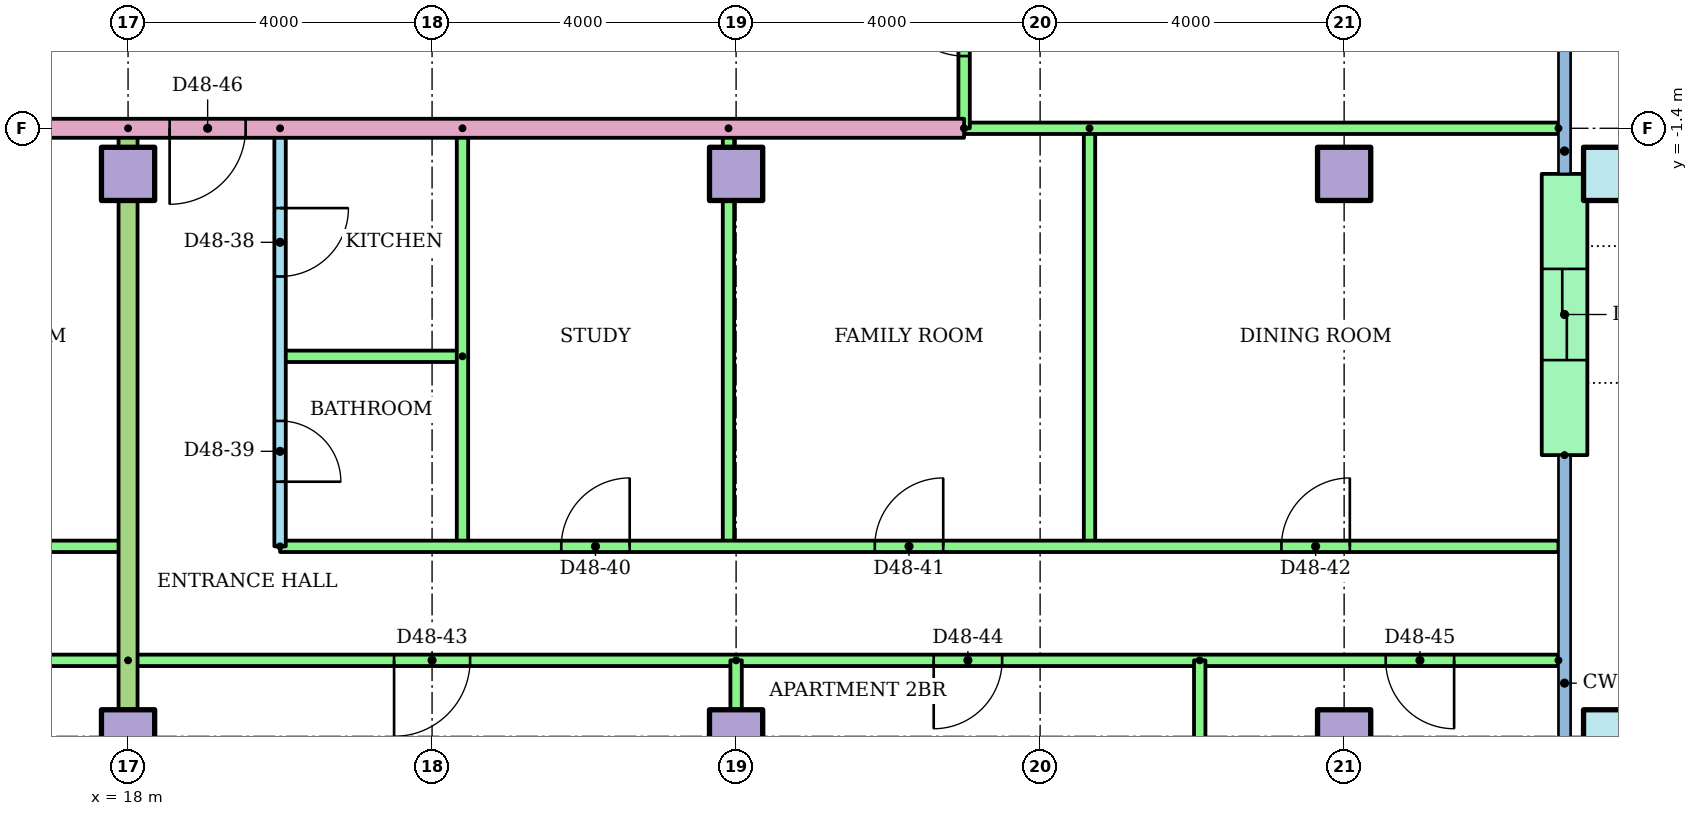
"""IFC4 building model, lengths in metres.
Left out: names, types, materials, properties, quantities, classifications, styles, units other than length and angle.
Written with IfcOpenShell. Run it as: python <this file> out.ifc"""

import sys

from ifc_helpers import new_model, si_unit, direction, frame, frame_2d, origin, origin_2d, place, context, subcontext, project, spatial, rectangle, hollow_rectangle, extrude, element, fill, save


model = new_model("IFC4")
c1 = context("Model", 3, precision=1e-05, world=origin(), true_north=direction((0.0, 1.0)))
c2 = subcontext(c1, "Body", "Model", "MODEL_VIEW")
j1 = project(units=[si_unit("LENGTHUNIT", "METRE"), si_unit("PLANEANGLEUNIT", "RADIAN")], contexts=[c1])
p1 = place(None, origin())
s1 = spatial("IfcSite", under=j1, at=p1, CompositionType="ELEMENT")
p2 = place(p1, origin())
s2 = spatial("IfcBuilding", under=s1, at=p2, CompositionType="ELEMENT")
p3 = place(p2, frame((0.0, 0.0, 184.5)))
s3 = spatial("IfcBuildingStorey", under=s2, at=p3, CompositionType="ELEMENT", Elevation=184.5)
for number, where in (
    (1, (18.0, -9.4, 0.0)),
    (2, (26.0, -9.4, 0.0)),
    (3, (34.0, -9.4, 0.0)),
):
    element("IfcColumn", number, at=place(p3, frame(where)), inside=s3, PredefinedType="COLUMN", context=c2, shape_type="SweptSolid", body=[
        extrude(rectangle(XDim=0.7, YDim=0.7, at=origin_2d()), origin(), (0.0, 0.0, 1.0), 3.2),
    ])
p4 = place(p3, frame((37.5, -9.4, 0.0)))
e4 = element("IfcColumn", 4, at=p4, inside=s3, PredefinedType="COLUMN", context=c2, shape_type="SweptSolid", body=[
    extrude(hollow_rectangle(XDim=0.7, YDim=0.7, WallThickness=0.036, at=origin_2d()), origin(), (0.0, 0.0, 1.0), 3.2),
])
for number, where in (
    (5, (18.0, -2.0, 0.0)),
    (6, (26.0, -2.0, 0.0)),
    (7, (34.0, -2.0, 0.0)),
):
    element("IfcColumn", number, at=place(p3, frame(where)), inside=s3, PredefinedType="COLUMN", context=c2, shape_type="SweptSolid", body=[
        extrude(rectangle(XDim=0.7, YDim=0.7, at=origin_2d()), origin(), (0.0, 0.0, 1.0), 3.2),
    ])
p5 = place(p3, frame((37.5, -2.0, 0.0)))
e8 = element("IfcColumn", 8, at=p5, inside=s3, PredefinedType="COLUMN", context=c2, shape_type="SweptSolid", body=[
    extrude(hollow_rectangle(XDim=0.7, YDim=0.7, WallThickness=0.036, at=origin_2d()), origin(), (0.0, 0.0, 1.0), 3.2),
])
p6 = place(p3, frame((36.9, -5.7, 0.0), z_axis=(0.0, 0.0, 1.0), x_axis=(0.0, 1.0, 0.0)))
e9 = element("IfcWall", 9, at=p6, inside=s3, PredefinedType="STANDARD", context=c2, shape_type="SweptSolid", body=[
    extrude(rectangle(XDim=3.7, YDim=0.6, at=frame_2d((1.85, 0.0))), origin(), (0.0, 0.0, 1.0), 2.92),
])
p7 = place(p6, frame((1.25, 0.0, 0.0)))
e10 = element("IfcOpeningElement", 10, at=p7, cuts=e9, PredefinedType="OPENING", context=c2, shape_type="SweptSolid", body=[
    extrude(rectangle(XDim=1.2, YDim=2.1, at=frame_2d((0.6, 1.05))), frame((0.0, 0.31, 0.0), z_axis=(0.0, -1.0, 0.0), x_axis=(1.0, 0.0, 0.0)), (0.0, 0.0, 1.0), 0.62),
])
p8 = place(p3, frame((12.0, -6.9, 0.0)))
e11 = element("IfcWall", 11, at=p8, inside=s3, PredefinedType="PARTITIONING", context=c2, shape_type="SweptSolid", body=[
    extrude(rectangle(XDim=6.0, YDim=0.15, at=frame_2d((3.0, 0.0))), origin(), (0.0, 0.0, 1.0), 2.4),
])
p9 = place(p8, frame((3.75, 0.0, 0.0)))
e12 = element("IfcOpeningElement", 12, at=p9, cuts=e11, PredefinedType="OPENING", context=c2, shape_type="SweptSolid", body=[
    extrude(rectangle(XDim=0.9, YDim=2.1, at=frame_2d((0.45, 1.05))), frame((0.0, 0.085, 0.0), z_axis=(0.0, -1.0, 0.0), x_axis=(1.0, 0.0, 0.0)), (0.0, 0.0, 1.0), 0.17),
])
p10 = place(p3, frame((18.0, -8.4, 0.0), z_axis=(0.0, 0.0, 1.0), x_axis=(-1.0, 0.0, 0.0)))
e13 = element("IfcWall", 13, at=p10, inside=s3, PredefinedType="PARTITIONING", context=c2, shape_type="SweptSolid", body=[
    extrude(rectangle(XDim=8.0, YDim=0.15, at=frame_2d((4.0, 0.0))), origin(), (0.0, 0.0, 1.0), 2.4),
])
p11 = place(p10, frame((5.55, 0.0, 0.0)))
e14 = element("IfcOpeningElement", 14, at=p11, cuts=e13, PredefinedType="OPENING", context=c2, shape_type="SweptSolid", body=[
    extrude(rectangle(XDim=0.9, YDim=2.1, at=frame_2d((0.45, 1.05))), frame((0.0, 0.085, 0.0), z_axis=(0.0, -1.0, 0.0), x_axis=(1.0, 0.0, 0.0)), (0.0, 0.0, 1.0), 0.17),
])
p12 = place(p10, frame((1.5, 0.0, 0.0)))
e15 = element("IfcOpeningElement", 15, at=p12, cuts=e13, PredefinedType="OPENING", context=c2, shape_type="SweptSolid", body=[
    extrude(rectangle(XDim=1.0, YDim=2.1, at=frame_2d((0.5, 1.05))), frame((0.0, 0.085, 0.0), z_axis=(0.0, -1.0, 0.0), x_axis=(1.0, 0.0, 0.0)), (0.0, 0.0, 1.0), 0.17),
])
p13 = place(p3, frame((20.0, -1.4, 0.0), z_axis=(0.0, 0.0, 1.0), x_axis=(0.0, -1.0, 0.0)))
e16 = element("IfcWall", 16, at=p13, inside=s3, PredefinedType="PARTITIONING", context=c2, shape_type="SweptSolid", body=[
    extrude(rectangle(XDim=5.5, YDim=0.15, at=frame_2d((2.75, 0.0))), origin(), (0.0, 0.0, 1.0), 2.4),
])
p14 = place(p13, frame((1.05, 0.0, 0.0)))
e17 = element("IfcOpeningElement", 17, at=p14, cuts=e16, PredefinedType="OPENING", context=c2, shape_type="SweptSolid", body=[
    extrude(rectangle(XDim=0.9, YDim=2.1, at=frame_2d((0.45, 1.05))), frame((0.0, 0.085, 0.0), z_axis=(0.0, -1.0, 0.0), x_axis=(1.0, 0.0, 0.0)), (0.0, 0.0, 1.0), 0.17),
])
p15 = place(p13, frame((3.85, 0.0, 0.0)))
e18 = element("IfcOpeningElement", 18, at=p15, cuts=e16, PredefinedType="OPENING", context=c2, shape_type="SweptSolid", body=[
    extrude(rectangle(XDim=0.8, YDim=2.1, at=frame_2d((0.4, 1.05))), frame((0.0, 0.085, 0.0), z_axis=(0.0, -1.0, 0.0), x_axis=(1.0, 0.0, 0.0)), (0.0, 0.0, 1.0), 0.17),
])
p16 = place(p3, frame((22.4, -4.4, 0.0), z_axis=(0.0, 0.0, 1.0), x_axis=(-1.0, 0.0, 0.0)))
e19 = element("IfcWall", 19, at=p16, inside=s3, PredefinedType="PARTITIONING", context=c2, shape_type="SweptSolid", body=[
    extrude(rectangle(XDim=2.4, YDim=0.15, at=frame_2d((1.2, 0.0))), origin(), (0.0, 0.0, 1.0), 2.4),
])
for number, where, z_axis, x_axis in (
    (20, (22.4, -1.4, 0.0), (0.0, 0.0, 1.0), (0.0, -1.0, 0.0)),
    (21, (25.9, -1.4, 0.0), (0.0, 0.0, 1.0), (0.0, -1.0, 0.0)),
    (22, (30.65, -1.4, 0.0), (0.0, 0.0, 1.0), (0.0, -1.0, 0.0)),
):
    element("IfcWall", number, at=place(p3, frame(where, z_axis=z_axis, x_axis=x_axis)), inside=s3, PredefinedType="PARTITIONING", context=c2, shape_type="SweptSolid", body=[
        extrude(rectangle(XDim=5.5, YDim=0.15, at=frame_2d((2.75, 0.0))), origin(), (0.0, 0.0, 1.0), 2.4),
    ])
p17 = place(p3, frame((20.0, -6.9, 0.0)))
e23 = element("IfcWall", 23, at=p17, inside=s3, PredefinedType="PARTITIONING", context=c2, shape_type="SweptSolid", body=[
    extrude(rectangle(XDim=16.82, YDim=0.15, at=frame_2d((8.41, 0.0))), origin(), (0.0, 0.0, 1.0), 2.4),
])
p18 = place(p17, frame((3.7, 0.0, 0.0)))
e24 = element("IfcOpeningElement", 24, at=p18, cuts=e23, PredefinedType="OPENING", context=c2, shape_type="SweptSolid", body=[
    extrude(rectangle(XDim=0.9, YDim=2.1, at=frame_2d((0.45, 1.05))), frame((0.0, 0.085, 0.0), z_axis=(0.0, -1.0, 0.0), x_axis=(1.0, 0.0, 0.0)), (0.0, 0.0, 1.0), 0.17),
])
p19 = place(p17, frame((7.825, 0.0, 0.0)))
e25 = element("IfcOpeningElement", 25, at=p19, cuts=e23, PredefinedType="OPENING", context=c2, shape_type="SweptSolid", body=[
    extrude(rectangle(XDim=0.9, YDim=2.1, at=frame_2d((0.45, 1.05))), frame((0.0, 0.085, 0.0), z_axis=(0.0, -1.0, 0.0), x_axis=(1.0, 0.0, 0.0)), (0.0, 0.0, 1.0), 0.17),
])
p20 = place(p17, frame((13.175, 0.0, 0.0)))
e26 = element("IfcOpeningElement", 26, at=p20, cuts=e23, PredefinedType="OPENING", context=c2, shape_type="SweptSolid", body=[
    extrude(rectangle(XDim=0.9, YDim=2.1, at=frame_2d((0.45, 1.05))), frame((0.0, 0.085, 0.0), z_axis=(0.0, -1.0, 0.0), x_axis=(1.0, 0.0, 0.0)), (0.0, 0.0, 1.0), 0.17),
])
p21 = place(p3, frame((36.82, -8.4, 0.0), z_axis=(0.0, 0.0, 1.0), x_axis=(-1.0, 0.0, 0.0)))
e27 = element("IfcWall", 27, at=p21, inside=s3, PredefinedType="PARTITIONING", context=c2, shape_type="SweptSolid", body=[
    extrude(rectangle(XDim=18.82, YDim=0.15, at=frame_2d((9.41, 0.0))), origin(), (0.0, 0.0, 1.0), 2.4),
])
p22 = place(p21, frame((14.32, 0.0, 0.0)))
e28 = element("IfcOpeningElement", 28, at=p22, cuts=e27, PredefinedType="OPENING", context=c2, shape_type="SweptSolid", body=[
    extrude(rectangle(XDim=1.0, YDim=2.1, at=frame_2d((0.5, 1.05))), frame((0.0, 0.085, 0.0), z_axis=(0.0, -1.0, 0.0), x_axis=(1.0, 0.0, 0.0)), (0.0, 0.0, 1.0), 0.17),
])
p23 = place(p21, frame((7.32, 0.0, 0.0)))
e29 = element("IfcOpeningElement", 29, at=p23, cuts=e27, PredefinedType="OPENING", context=c2, shape_type="SweptSolid", body=[
    extrude(rectangle(XDim=0.9, YDim=2.1, at=frame_2d((0.45, 1.05))), frame((0.0, 0.085, 0.0), z_axis=(0.0, -1.0, 0.0), x_axis=(1.0, 0.0, 0.0)), (0.0, 0.0, 1.0), 0.17),
])
p24 = place(p21, frame((1.373, 0.0, 0.0)))
e30 = element("IfcOpeningElement", 30, at=p24, cuts=e27, PredefinedType="OPENING", context=c2, shape_type="SweptSolid", body=[
    extrude(rectangle(XDim=0.9, YDim=2.1, at=frame_2d((0.45, 1.05))), frame((0.0, 0.085, 0.0), z_axis=(0.0, -1.0, 0.0), x_axis=(1.0, 0.0, 0.0)), (0.0, 0.0, 1.0), 0.17),
])
p25 = place(p3, frame((26.0, -8.4, 0.0), z_axis=(0.0, 0.0, 1.0), x_axis=(0.0, -1.0, 0.0)))
e31 = element("IfcWall", 31, at=p25, inside=s3, PredefinedType="PARTITIONING", context=c2, shape_type="SweptSolid", body=[
    extrude(rectangle(XDim=8.01, YDim=0.15, at=frame_2d((4.005, 0.0))), origin(), (0.0, 0.0, 1.0), 2.4),
])
p26 = place(p3, frame((32.1, -8.4, 0.0), z_axis=(0.0, 0.0, 1.0), x_axis=(0.0, -1.0, 0.0)))
e32 = element("IfcWall", 32, at=p26, inside=s3, PredefinedType="PARTITIONING", context=c2, shape_type="SweptSolid", body=[
    extrude(rectangle(XDim=6.22, YDim=0.15, at=frame_2d((3.11, 0.0))), origin(), (0.0, 0.0, 1.0), 2.4),
])
p27 = place(p3, frame((18.0, -1.4, 0.0), z_axis=(0.0, 0.0, 1.0), x_axis=(0.0, -1.0, 0.0)))
e33 = element("IfcWall", 33, at=p27, inside=s3, PredefinedType="PARTITIONING", context=c2, shape_type="SweptSolid", body=[
    extrude(rectangle(XDim=15.01, YDim=0.25, at=frame_2d((7.505, 0.0))), origin(), (0.0, 0.0, 1.0), 2.4),
])
p28 = place(p3, frame((29.0, -1.4, 0.0), z_axis=(0.0, 0.0, 1.0), x_axis=(-1.0, 0.0, 0.0)))
e34 = element("IfcWall", 34, at=p28, inside=s3, PredefinedType="PARTITIONING", context=c2, shape_type="SweptSolid", body=[
    extrude(rectangle(XDim=15.0, YDim=0.25, at=frame_2d((7.5, 0.0))), origin(), (0.0, 0.0, 1.0), 2.4),
])
p29 = place(p28, frame((9.453, 0.0, 0.0)))
e35 = element("IfcOpeningElement", 35, at=p29, cuts=e34, PredefinedType="OPENING", context=c2, shape_type="SweptSolid", body=[
    extrude(rectangle(XDim=1.0, YDim=2.1, at=frame_2d((0.5, 1.05))), frame((0.0, 0.135, 0.0), z_axis=(0.0, -1.0, 0.0), x_axis=(1.0, 0.0, 0.0)), (0.0, 0.0, 1.0), 0.27),
])
p30 = place(p3, frame((36.82, -1.4, 0.0), z_axis=(0.0, 0.0, 1.0), x_axis=(-1.0, 0.0, 0.0)))
e36 = element("IfcWall", 36, at=p30, inside=s3, PredefinedType="PARTITIONING", context=c2, shape_type="SweptSolid", body=[
    extrude(rectangle(XDim=7.82, YDim=0.15, at=frame_2d((3.91, 0.0))), origin(), (0.0, 0.0, 1.0), 2.4),
])
p31 = place(p3, frame((29.0, -1.4, 0.0), z_axis=(0.0, 0.0, 1.0), x_axis=(0.0, 1.0, 0.0)))
e37 = element("IfcWall", 37, at=p31, inside=s3, PredefinedType="PARTITIONING", context=c2, shape_type="SweptSolid", body=[
    extrude(rectangle(XDim=2.8, YDim=0.15, at=frame_2d((1.4, 0.0))), origin(), (0.0, 0.0, 1.0), 2.4),
])
p32 = place(p31, frame((0.95, 0.0, 0.0)))
e38 = element("IfcOpeningElement", 38, at=p32, cuts=e37, PredefinedType="OPENING", context=c2, shape_type="SweptSolid", body=[
    extrude(rectangle(XDim=0.9, YDim=2.1, at=frame_2d((0.45, 1.05))), frame((0.0, 0.085, 0.0), z_axis=(0.0, -1.0, 0.0), x_axis=(1.0, 0.0, 0.0)), (0.0, 0.0, 1.0), 0.17),
])
p33 = place(p14, origin())
e39 = element("IfcDoor", 39, at=p33, inside=s3, OperationType="SINGLE_SWING_LEFT", PredefinedType="DOOR", context=c2, shape_type="SweptSolid", body=[
    extrude(rectangle(XDim=0.9, YDim=2.1, at=frame_2d((0.45, 1.05))), frame((0.0, 0.025, 0.0), z_axis=(0.0, -1.0, 0.0), x_axis=(1.0, 0.0, 0.0)), (0.0, 0.0, 1.0), 0.05),
])
fill(e17, e39)
p34 = place(p15, origin())
e40 = element("IfcDoor", 40, at=p34, inside=s3, OperationType="SINGLE_SWING_RIGHT", PredefinedType="DOOR", context=c2, shape_type="SweptSolid", body=[
    extrude(rectangle(XDim=0.8, YDim=2.1, at=frame_2d((0.4, 1.05))), frame((0.0, 0.025, 0.0), z_axis=(0.0, -1.0, 0.0), x_axis=(1.0, 0.0, 0.0)), (0.0, 0.0, 1.0), 0.05),
])
fill(e18, e40)
p35 = place(p18, origin())
e41 = element("IfcDoor", 41, at=p35, inside=s3, OperationType="SINGLE_SWING_RIGHT", PredefinedType="DOOR", context=c2, shape_type="SweptSolid", body=[
    extrude(rectangle(XDim=0.9, YDim=2.1, at=frame_2d((0.45, 1.05))), frame((0.0, 0.025, 0.0), z_axis=(0.0, -1.0, 0.0), x_axis=(1.0, 0.0, 0.0)), (0.0, 0.0, 1.0), 0.05),
])
fill(e24, e41)
p36 = place(p19, origin())
e42 = element("IfcDoor", 42, at=p36, inside=s3, OperationType="SINGLE_SWING_RIGHT", PredefinedType="DOOR", context=c2, shape_type="SweptSolid", body=[
    extrude(rectangle(XDim=0.9, YDim=2.1, at=frame_2d((0.45, 1.05))), frame((0.0, 0.025, 0.0), z_axis=(0.0, -1.0, 0.0), x_axis=(1.0, 0.0, 0.0)), (0.0, 0.0, 1.0), 0.05),
])
fill(e25, e42)
p37 = place(p20, origin())
e43 = element("IfcDoor", 43, at=p37, inside=s3, OperationType="SINGLE_SWING_RIGHT", PredefinedType="DOOR", context=c2, shape_type="SweptSolid", body=[
    extrude(rectangle(XDim=0.9, YDim=2.1, at=frame_2d((0.45, 1.05))), frame((0.0, 0.025, 0.0), z_axis=(0.0, -1.0, 0.0), x_axis=(1.0, 0.0, 0.0)), (0.0, 0.0, 1.0), 0.05),
])
fill(e26, e43)
p38 = place(p22, origin())
e44 = element("IfcDoor", 44, at=p38, inside=s3, OperationType="SINGLE_SWING_RIGHT", PredefinedType="DOOR", context=c2, shape_type="SweptSolid", body=[
    extrude(rectangle(XDim=1.0, YDim=2.1, at=frame_2d((0.5, 1.05))), frame((0.0, 0.025, 0.0), z_axis=(0.0, -1.0, 0.0), x_axis=(1.0, 0.0, 0.0)), (0.0, 0.0, 1.0), 0.05),
])
fill(e28, e44)
p39 = place(p23, origin())
e45 = element("IfcDoor", 45, at=p39, inside=s3, OperationType="SINGLE_SWING_RIGHT", PredefinedType="DOOR", context=c2, shape_type="SweptSolid", body=[
    extrude(rectangle(XDim=0.9, YDim=2.1, at=frame_2d((0.45, 1.05))), frame((0.0, 0.025, 0.0), z_axis=(0.0, -1.0, 0.0), x_axis=(1.0, 0.0, 0.0)), (0.0, 0.0, 1.0), 0.05),
])
fill(e29, e45)
p40 = place(p24, origin())
e46 = element("IfcDoor", 46, at=p40, inside=s3, OperationType="SINGLE_SWING_LEFT", PredefinedType="DOOR", context=c2, shape_type="SweptSolid", body=[
    extrude(rectangle(XDim=0.9, YDim=2.1, at=frame_2d((0.45, 1.05))), frame((0.0, 0.025, 0.0), z_axis=(0.0, -1.0, 0.0), x_axis=(1.0, 0.0, 0.0)), (0.0, 0.0, 1.0), 0.05),
])
fill(e30, e46)
p41 = place(p29, origin())
e47 = element("IfcDoor", 47, at=p41, inside=s3, OperationType="SINGLE_SWING_RIGHT", PredefinedType="DOOR", context=c2, shape_type="SweptSolid", body=[
    extrude(rectangle(XDim=1.0, YDim=2.1, at=frame_2d((0.5, 1.05))), frame((0.0, 0.025, 0.0), z_axis=(0.0, -1.0, 0.0), x_axis=(1.0, 0.0, 0.0)), (0.0, 0.0, 1.0), 0.05),
])
fill(e35, e47)
p42 = place(p32, origin())
e48 = element("IfcDoor", 48, at=p42, inside=s3, OperationType="SINGLE_SWING_RIGHT", PredefinedType="DOOR", context=c2, shape_type="SweptSolid", body=[
    extrude(rectangle(XDim=0.9, YDim=2.1, at=frame_2d((0.45, 1.05))), frame((0.0, 0.025, 0.0), z_axis=(0.0, -1.0, 0.0), x_axis=(1.0, 0.0, 0.0)), (0.0, 0.0, 1.0), 0.05),
])
fill(e38, e48)
p43 = place(p7, origin())
e49 = element("IfcDoor", 49, at=p43, inside=s3, OperationType="SLIDING_TO_LEFT", PredefinedType="DOOR", context=c2, shape_type="SweptSolid", body=[
    extrude(rectangle(XDim=1.2, YDim=2.1, at=frame_2d((0.6, 1.05))), frame((0.0, 0.025, 0.0), z_axis=(0.0, -1.0, 0.0), x_axis=(1.0, 0.0, 0.0)), (0.0, 0.0, 1.0), 0.05),
])
fill(e10, e49)
save(model, sys.argv[1])
